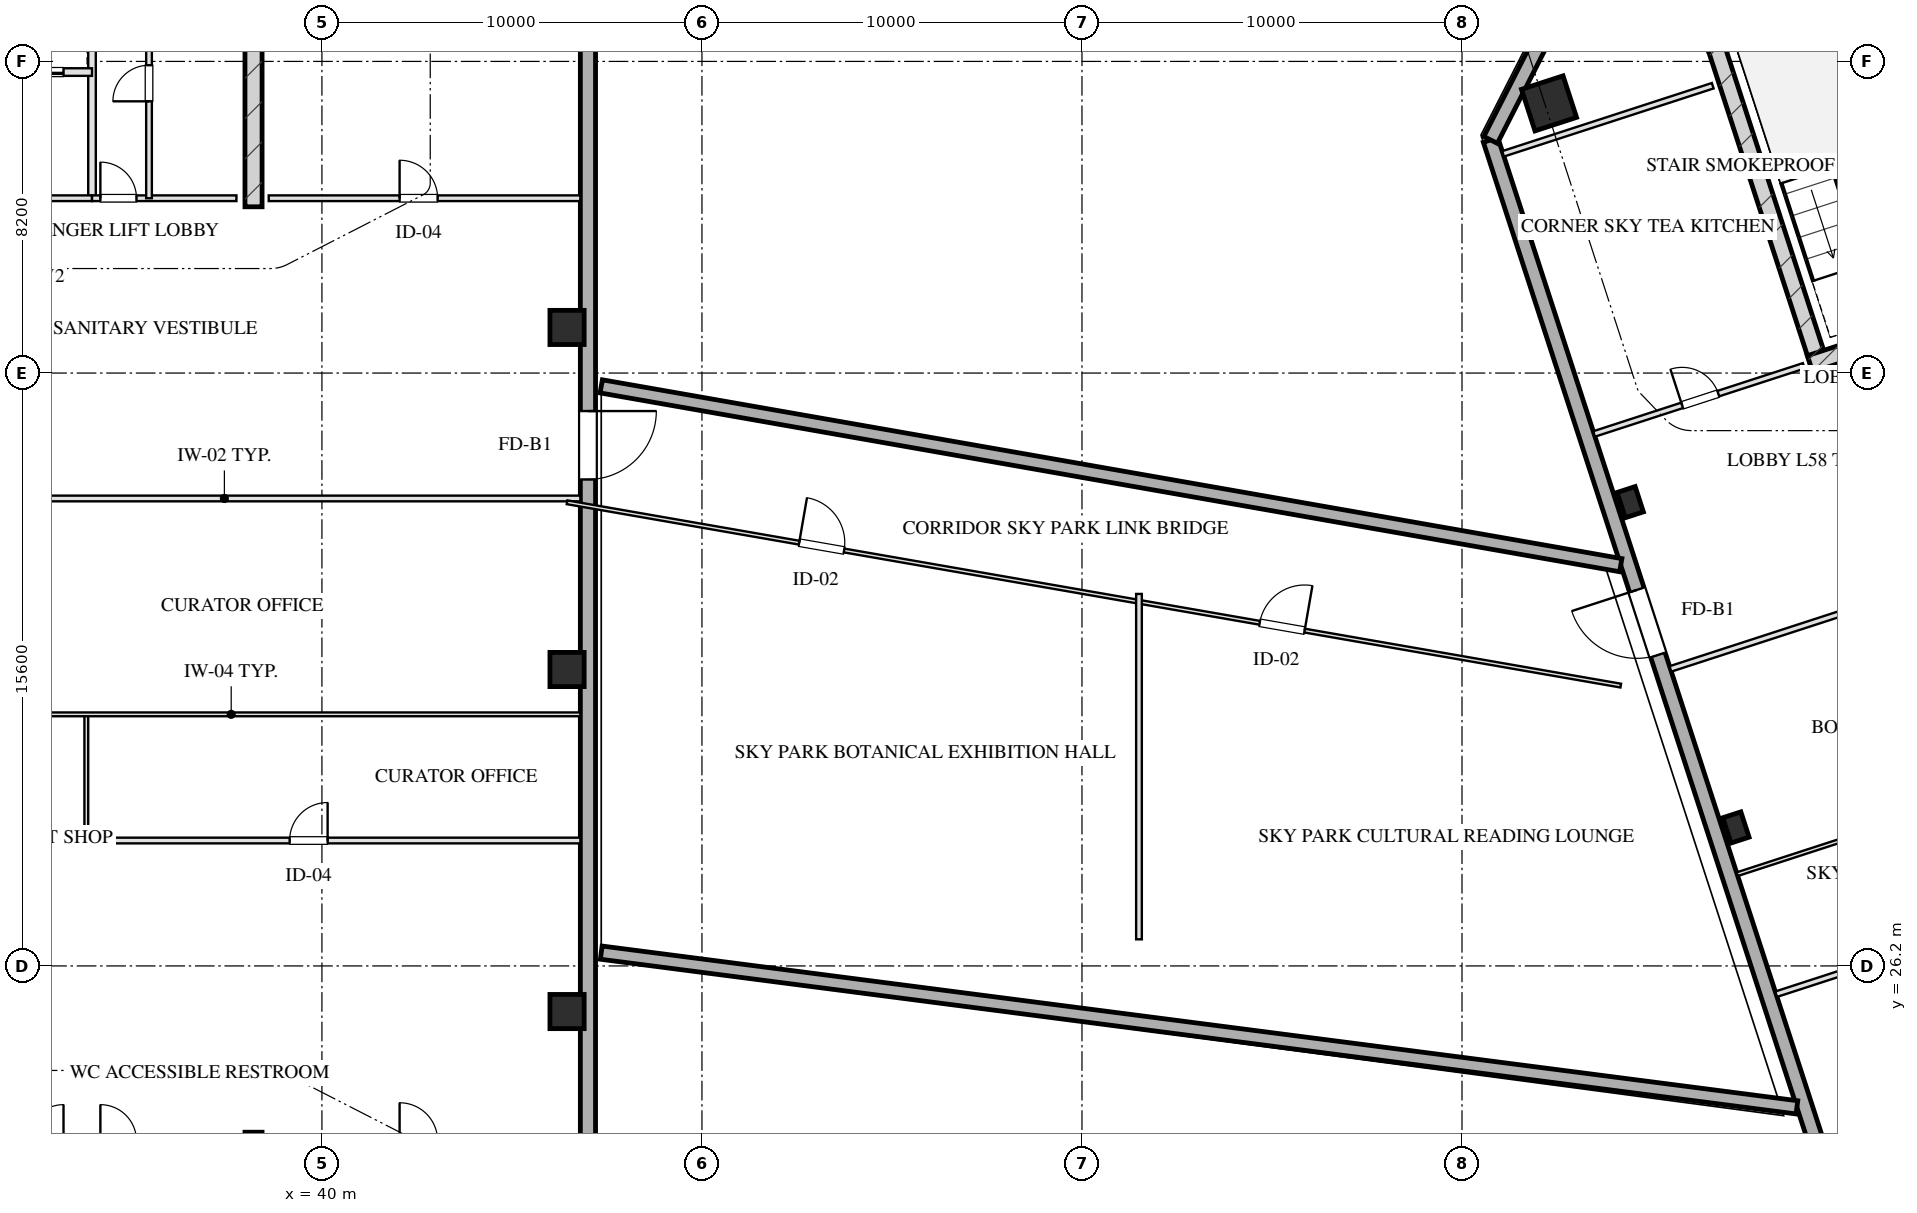
"""IFC4 building model, lengths in metres.
Left out: names, types, materials, properties, quantities, classifications, styles, units other than length and angle.
Written with IfcOpenShell. Run it as: python <this file> out.ifc"""

import sys

from ifc_helpers import new_model, si_unit, direction, frame, frame_2d, origin, origin_2d, place, context, subcontext, project, spatial, rectangle, hollow_rectangle, extrude, element, fill, save


model = new_model("IFC4")
c1 = context("Model", 3, precision=1e-05, world=origin(), true_north=direction((0.0, 1.0)))
c2 = subcontext(c1, "Body", "Model", "MODEL_VIEW")
j1 = project(units=[si_unit("LENGTHUNIT", "METRE"), si_unit("PLANEANGLEUNIT", "RADIAN")], contexts=[c1])
p1 = place(None, origin())
s1 = spatial("IfcSite", under=j1, at=p1, CompositionType="ELEMENT")
p2 = place(p1, origin())
s2 = spatial("IfcBuilding", under=s1, at=p2, CompositionType="ELEMENT")
p3 = place(p2, frame((0.0, 0.0, 216.2)))
s3 = spatial("IfcBuildingStorey", under=s2, at=p3, CompositionType="ELEMENT", Elevation=216.2)
for number, where, z_axis, x_axis in (
    (1, (38.2, 21.825, 0.0), (0.0, 0.0, 1.0), (0.0, -1.0, 0.0)),
    (2, (38.2, 46.175, 0.0), (0.0, 0.0, 1.0), (0.0, 1.0, 0.0)),
):
    element("IfcWall", number, at=place(p3, frame(where, z_axis=z_axis, x_axis=x_axis)), inside=s3, PredefinedType="SHEAR", context=c2, shape_type="SweptSolid", body=[
        extrude(rectangle(XDim=9.33, YDim=0.45, at=frame_2d((4.665, 0.0))), origin(), (0.0, 0.0, 1.0), 3.45),
    ])
p4 = place(p3, frame((79.442, 41.899, 0.0), z_axis=(0.0, 0.0, 1.0), x_axis=(-0.309035778627, 0.951050412717, 0.0)))
e3 = element("IfcWall", 3, at=p4, inside=s3, PredefinedType="SHEAR", context=c2, shape_type="SweptSolid", body=[
    extrude(rectangle(XDim=9.33, YDim=0.45, at=frame_2d((4.665, 0.0))), origin(), (0.0, 0.0, 1.0), 3.45),
])
p5 = place(p3, frame((79.159, 42.043, 0.0), z_axis=(0.0, 0.0, 1.0), x_axis=(0.951047485828, 0.309044785913, 0.0)))
e4 = element("IfcWall", 4, at=p5, inside=s3, PredefinedType="SHEAR", context=c2, shape_type="SweptSolid", body=[
    extrude(rectangle(XDim=4.145, YDim=0.45, at=frame_2d((2.073, 0.0))), origin(), (0.0, 0.0, 1.0), 3.45),
])
for number, where, z_axis, x_axis in (
    (5, (46.45, 25.0, 0.0), (0.0, 0.0, 1.0), (1.0, 0.0, 0.0)),
    (6, (46.45, 34.0, 0.0), (0.0, 0.0, 1.0), (1.0, 0.0, 0.0)),
    (7, (46.45, 43.0, 0.0), (0.0, 0.0, 1.0), (1.0, 0.0, 0.0)),
):
    element("IfcColumn", number, at=place(p3, frame(where, z_axis=z_axis, x_axis=x_axis)), inside=s3, PredefinedType="COLUMN", context=c2, shape_type="SweptSolid", body=[
        extrude(hollow_rectangle(XDim=0.9, YDim=0.9, WallThickness=0.032, at=origin_2d()), origin(), (0.0, 0.0, 1.0), 3.451),
    ])
p6 = place(p3, frame((72.29, 48.896, 0.0), z_axis=(0.0, 0.0, 1.0), x_axis=(0.951056516295, 0.309016994375, 0.0)))
e8 = element("IfcColumn", 8, at=p6, inside=s3, PredefinedType="COLUMN", context=c2, shape_type="SweptSolid", body=[
    extrude(hollow_rectangle(XDim=1.15, YDim=1.15, WallThickness=0.04, at=origin_2d()), origin(), (0.0, 0.0, 1.0), 3.451),
])
for number, where, z_axis, x_axis in (
    (9, (77.208, 29.844, 0.0), (0.0, 0.0, 1.0), (0.951, 0.309, 0.0)),
    (10, (74.427, 38.403, 0.0), (0.0, 0.0, 1.0), (0.951, 0.309, 0.0)),
):
    element("IfcColumn", number, at=place(p3, frame(where, z_axis=z_axis, x_axis=x_axis)), inside=s3, PredefinedType="COLUMN", context=c2, shape_type="SweptSolid", body=[
        extrude(hollow_rectangle(XDim=0.5, YDim=0.7, WallThickness=0.025, at=origin_2d()), origin(), (0.0, 0.0, 1.0), 3.451),
    ])
p7 = place(p3, frame((47.0, 57.2, 0.0), z_axis=(0.0, 0.0, 1.0), x_axis=(0.0, -1.0, 0.0)))
e11 = element("IfcWall", 11, at=p7, inside=s3, PredefinedType="SOLIDWALL", context=c2, shape_type="SweptSolid", body=[
    extrude(rectangle(XDim=46.4, YDim=0.4, at=frame_2d((23.2, 0.0))), origin(), (0.0, 0.0, 1.0), 2.55),
])
p8 = place(p7, frame((16.4, 0.0, 0.0)))
e12 = element("IfcOpeningElement", 12, at=p8, cuts=e11, PredefinedType="OPENING", context=c2, shape_type="SweptSolid", body=[
    extrude(rectangle(XDim=1.8, YDim=2.2, at=frame_2d((0.9, 1.1))), frame((0.0, 0.21, 0.0), z_axis=(0.0, -1.0, 0.0), x_axis=(1.0, 0.0, 0.0)), (0.0, 0.0, 1.0), 0.42),
])
p9 = place(p3, frame((82.618, 11.414, 0.0), z_axis=(0.0, 0.0, 1.0), x_axis=(-0.309016491071, 0.951056679828, 0.0)))
e13 = element("IfcWall", 13, at=p9, inside=s3, PredefinedType="SOLIDWALL", context=c2, shape_type="SweptSolid", body=[
    extrude(rectangle(XDim=38.4, YDim=0.4, at=frame_2d((19.2, 0.0))), origin(), (0.0, 0.0, 1.0), 2.55),
])
p10 = place(p9, frame((24.15, 0.0, 0.0)))
e14 = element("IfcOpeningElement", 14, at=p10, cuts=e13, PredefinedType="OPENING", context=c2, shape_type="SweptSolid", body=[
    extrude(rectangle(XDim=1.8, YDim=2.2, at=frame_2d((0.9, 1.1))), frame((0.0, 0.21, 0.0), z_axis=(0.0, -1.0, 0.0), x_axis=(1.0, 0.0, 0.0)), (0.0, 0.0, 1.0), 0.42),
])
p11 = place(p3, frame((70.752, 47.934, 0.0), z_axis=(0.0, 0.0, 1.0), x_axis=(0.453949291228, 0.891027519774, 0.0)))
e15 = element("IfcWall", 15, at=p11, inside=s3, PredefinedType="SOLIDWALL", context=c2, shape_type="SweptSolid", body=[
    extrude(rectangle(XDim=3.111, YDim=0.4, at=frame_2d((1.556, 0.0))), origin(), (0.0, 0.0, 1.0), 2.55),
])
p12 = place(p3, frame((47.35, 26.55, 0.0), z_axis=(0.0, 0.0, 1.0), x_axis=(0.991732402874, -0.128323189996, 0.0)))
e16 = element("IfcWall", 16, at=p12, inside=s3, PredefinedType="SOLIDWALL", context=c2, shape_type="SweptSolid", body=[
    extrude(rectangle(XDim=31.725, YDim=0.35, at=frame_2d((15.862, 0.0))), origin(), (0.0, 0.0, 1.0), 3.15),
])
p13 = place(p3, frame((74.177, 36.745, 0.0), z_axis=(0.0, 0.0, 1.0), x_axis=(-0.984966283934, 0.172746691759, 0.0)))
e17 = element("IfcWall", 17, at=p13, inside=s3, PredefinedType="SOLIDWALL", context=c2, shape_type="SweptSolid", body=[
    extrude(rectangle(XDim=27.237, YDim=0.35, at=frame_2d((13.618, 0.0))), origin(), (0.0, 0.0, 1.0), 3.15),
])
p14 = place(p3, frame((33.95, 46.4, 0.0), z_axis=(0.0, 0.0, 1.0), x_axis=(0.0, 1.0, 0.0)))
e18 = element("IfcWall", 18, at=p14, inside=s3, PredefinedType="PARTITIONING", context=c2, shape_type="SweptSolid", body=[
    extrude(rectangle(XDim=8.43, YDim=0.2, at=frame_2d((4.215, 0.0))), origin(), (0.0, 0.0, 1.0), 3.155),
])
p15 = place(p3, frame((29.55, 46.4, 0.0), z_axis=(0.0, 0.0, 1.0), x_axis=(1.0, 0.0, 0.0)))
e19 = element("IfcWall", 19, at=p15, inside=s3, PredefinedType="PARTITIONING", context=c2, shape_type="SweptSolid", body=[
    extrude(rectangle(XDim=4.4, YDim=0.15, at=frame_2d((2.2, 0.0))), origin(), (0.0, 0.0, 1.0), 3.155),
])
p16 = place(p15, frame((1.45, 0.0, 0.0)))
e20 = element("IfcOpeningElement", 20, at=p16, cuts=e19, PredefinedType="OPENING", context=c2, shape_type="SweptSolid", body=[
    extrude(rectangle(XDim=1.5, YDim=2.05, at=frame_2d((0.75, 1.025))), frame((0.0, 0.085, 0.0), z_axis=(0.0, -1.0, 0.0), x_axis=(1.0, 0.0, 0.0)), (0.0, 0.0, 1.0), 0.17),
])
p17 = place(p3, frame((29.55, 49.72, 0.0), z_axis=(0.0, 0.0, 1.0), x_axis=(1.0, 0.0, 0.0)))
e21 = element("IfcWall", 21, at=p17, inside=s3, PredefinedType="PARTITIONING", context=c2, shape_type="SweptSolid", body=[
    extrude(rectangle(XDim=4.4, YDim=0.2, at=frame_2d((2.2, 0.0))), origin(), (0.0, 0.0, 1.0), 3.155),
])
p18 = place(p17, frame((0.45, 0.0, 0.0)))
e22 = element("IfcOpeningElement", 22, at=p18, cuts=e21, PredefinedType="OPENING", context=c2, shape_type="SweptSolid", body=[
    extrude(rectangle(XDim=1.1, YDim=2.05, at=frame_2d((0.55, 1.025))), frame((0.0, 0.11, 0.0), z_axis=(0.0, -1.0, 0.0), x_axis=(1.0, 0.0, 0.0)), (0.0, 0.0, 1.0), 0.22),
])
p19 = place(p17, frame((2.55, 0.0, 0.0)))
e23 = element("IfcOpeningElement", 23, at=p19, cuts=e21, PredefinedType="OPENING", context=c2, shape_type="SweptSolid", body=[
    extrude(rectangle(XDim=1.1, YDim=2.05, at=frame_2d((0.55, 1.025))), frame((0.0, 0.11, 0.0), z_axis=(0.0, -1.0, 0.0), x_axis=(1.0, 0.0, 0.0)), (0.0, 0.0, 1.0), 0.22),
])
p20 = place(p3, frame((33.95, 46.4, 0.0), z_axis=(0.0, 0.0, 1.0), x_axis=(1.0, 0.0, 0.0)))
e24 = element("IfcWall", 24, at=p20, inside=s3, PredefinedType="PARTITIONING", context=c2, shape_type="SweptSolid", body=[
    extrude(rectangle(XDim=3.8, YDim=0.15, at=frame_2d((1.9, 0.0))), origin(), (0.0, 0.0, 1.0), 3.155),
])
p21 = place(p20, frame((0.22, 0.0, 0.0)))
e25 = element("IfcOpeningElement", 25, at=p21, cuts=e24, PredefinedType="OPENING", context=c2, shape_type="SweptSolid", body=[
    extrude(rectangle(XDim=0.95, YDim=2.05, at=frame_2d((0.475, 1.025))), frame((0.0, 0.085, 0.0), z_axis=(0.0, -1.0, 0.0), x_axis=(1.0, 0.0, 0.0)), (0.0, 0.0, 1.0), 0.17),
])
p22 = place(p3, frame((35.45, 46.4, 0.0), z_axis=(0.0, 0.0, 1.0), x_axis=(0.0, 1.0, 0.0)))
e26 = element("IfcWall", 26, at=p22, inside=s3, PredefinedType="PARTITIONING", context=c2, shape_type="SweptSolid", body=[
    extrude(rectangle(XDim=8.43, YDim=0.15, at=frame_2d((4.215, 0.0))), origin(), (0.0, 0.0, 1.0), 2.745),
])
p23 = place(p22, frame((2.55, 0.0, 0.0)))
e27 = element("IfcOpeningElement", 27, at=p23, cuts=e26, PredefinedType="OPENING", context=c2, shape_type="SweptSolid", body=[
    extrude(rectangle(XDim=0.95, YDim=2.05, at=frame_2d((0.475, 1.025))), frame((0.0, 0.085, 0.0), z_axis=(0.0, -1.0, 0.0), x_axis=(1.0, 0.0, 0.0)), (0.0, 0.0, 1.0), 0.17),
])
p24 = place(p22, frame((4.7, 0.0, 0.0)))
e28 = element("IfcOpeningElement", 28, at=p24, cuts=e26, PredefinedType="OPENING", context=c2, shape_type="SweptSolid", body=[
    extrude(rectangle(XDim=0.9, YDim=2.05, at=frame_2d((0.45, 1.025))), frame((0.0, 0.085, 0.0), z_axis=(0.0, -1.0, 0.0), x_axis=(1.0, 0.0, 0.0)), (0.0, 0.0, 1.0), 0.17),
])
p25 = place(p22, frame((6.8, 0.0, 0.0)))
e29 = element("IfcOpeningElement", 29, at=p25, cuts=e26, PredefinedType="OPENING", context=c2, shape_type="SweptSolid", body=[
    extrude(rectangle(XDim=0.9, YDim=2.05, at=frame_2d((0.45, 1.025))), frame((0.0, 0.085, 0.0), z_axis=(0.0, -1.0, 0.0), x_axis=(1.0, 0.0, 0.0)), (0.0, 0.0, 1.0), 0.17),
])
p26 = place(p3, frame((38.6, 46.4, 0.0), z_axis=(0.0, 0.0, 1.0), x_axis=(1.0, 0.0, 0.0)))
e30 = element("IfcWall", 30, at=p26, inside=s3, PredefinedType="PARTITIONING", context=c2, shape_type="SweptSolid", body=[
    extrude(rectangle(XDim=8.2, YDim=0.15, at=frame_2d((4.1, 0.0))), origin(), (0.0, 0.0, 1.0), 3.155),
])
p27 = place(p26, frame((3.444, 0.0, 0.0)))
e31 = element("IfcOpeningElement", 31, at=p27, cuts=e30, PredefinedType="OPENING", context=c2, shape_type="SweptSolid", body=[
    extrude(rectangle(XDim=1.0, YDim=2.05, at=frame_2d((0.5, 1.025))), frame((0.0, 0.085, 0.0), z_axis=(0.0, -1.0, 0.0), x_axis=(1.0, 0.0, 0.0)), (0.0, 0.0, 1.0), 0.17),
])
p28 = place(p3, frame((28.425, 29.5, 0.0), z_axis=(0.0, 0.0, 1.0), x_axis=(1.0, 0.0, 0.0)))
e32 = element("IfcWall", 32, at=p28, inside=s3, PredefinedType="PARTITIONING", context=c2, shape_type="SweptSolid", body=[
    extrude(rectangle(XDim=18.375, YDim=0.15, at=frame_2d((9.188, 0.0))), origin(), (0.0, 0.0, 1.0), 3.155),
])
p29 = place(p28, frame((10.725, 0.0, 0.0)))
e33 = element("IfcOpeningElement", 33, at=p29, cuts=e32, PredefinedType="OPENING", context=c2, shape_type="SweptSolid", body=[
    extrude(rectangle(XDim=1.0, YDim=2.05, at=frame_2d((0.5, 1.025))), frame((0.0, 0.085, 0.0), z_axis=(0.0, -1.0, 0.0), x_axis=(1.0, 0.0, 0.0)), (0.0, 0.0, 1.0), 0.17),
])
p30 = place(p3, frame((28.425, 38.5, 0.0), z_axis=(0.0, 0.0, 1.0), x_axis=(1.0, 0.0, 0.0)))
e34 = element("IfcWall", 34, at=p30, inside=s3, PredefinedType="PARTITIONING", context=c2, shape_type="SweptSolid", body=[
    extrude(rectangle(XDim=18.375, YDim=0.15, at=frame_2d((9.188, 0.0))), origin(), (0.0, 0.0, 1.0), 3.155),
])
p31 = place(p3, frame((33.8, 29.5, 0.0), z_axis=(0.0, 0.0, 1.0), x_axis=(0.0, 1.0, 0.0)))
e35 = element("IfcWall", 35, at=p31, inside=s3, PredefinedType="MOVABLE", context=c2, shape_type="SweptSolid", body=[
    extrude(rectangle(XDim=3.32, YDim=0.1, at=frame_2d((1.66, 0.0))), origin(), (0.0, 0.0, 1.0), 3.155),
])
p32 = place(p3, frame((28.425, 32.82, 0.0), z_axis=(0.0, 0.0, 1.0), x_axis=(1.0, 0.0, 0.0)))
e36 = element("IfcWall", 36, at=p32, inside=s3, PredefinedType="MOVABLE", context=c2, shape_type="SweptSolid", body=[
    extrude(rectangle(XDim=18.375, YDim=0.1, at=frame_2d((9.188, 0.0))), origin(), (0.0, 0.0, 1.0), 3.155),
])
p33 = place(p3, frame((71.081, 47.568, 0.0), z_axis=(0.0, 0.0, 1.0), x_axis=(0.951059431056, 0.309008023519, 0.0)))
e37 = element("IfcWall", 37, at=p33, inside=s3, PredefinedType="PARTITIONING", context=c2, shape_type="SweptSolid", body=[
    extrude(rectangle(XDim=5.8, YDim=0.15, at=frame_2d((2.9, 0.0))), origin(), (0.0, 0.0, 1.0), 3.155),
])
p34 = place(p3, frame((73.476, 40.197, 0.0), z_axis=(0.0, 0.0, 1.0), x_axis=(0.951059431056, 0.309008023519, 0.0)))
e38 = element("IfcWall", 38, at=p34, inside=s3, PredefinedType="PARTITIONING", context=c2, shape_type="SweptSolid", body=[
    extrude(rectangle(XDim=5.8, YDim=0.15, at=frame_2d((2.9, 0.0))), origin(), (0.0, 0.0, 1.0), 3.155),
])
p35 = place(p34, frame((2.436, 0.0, 0.0)))
e39 = element("IfcOpeningElement", 39, at=p35, cuts=e38, PredefinedType="OPENING", context=c2, shape_type="SweptSolid", body=[
    extrude(rectangle(XDim=1.0, YDim=2.05, at=frame_2d((0.5, 1.025))), frame((0.0, 0.085, 0.0), z_axis=(0.0, -1.0, 0.0), x_axis=(1.0, 0.0, 0.0)), (0.0, 0.0, 1.0), 0.17),
])
for number, where, z_axis, x_axis in (
    (40, (78.266, 25.456, 0.0), (0.0, 0.0, 1.0), (0.951, 0.309, 0.0)),
    (41, (75.485, 34.015, 0.0), (0.0, 0.0, 1.0), (0.951, 0.309, 0.0)),
):
    element("IfcWall", number, at=place(p3, frame(where, z_axis=z_axis, x_axis=x_axis)), inside=s3, PredefinedType="PARTITIONING", context=c2, shape_type="SweptSolid", body=[
        extrude(rectangle(XDim=10.175, YDim=0.15, at=frame_2d((5.087, 0.0))), origin(), (0.0, 0.0, 1.0), 3.155),
    ])
p36 = place(p3, frame((77.24, 28.613, 0.0), z_axis=(0.0, 0.0, 1.0), x_axis=(0.951055402118, 0.30902042344, 0.0)))
e42 = element("IfcWall", 42, at=p36, inside=s3, PredefinedType="MOVABLE", context=c2, shape_type="SweptSolid", body=[
    extrude(rectangle(XDim=10.175, YDim=0.1, at=frame_2d((5.087, 0.0))), origin(), (0.0, 0.0, 1.0), 3.155),
])
p37 = place(p3, frame((46.45, 38.4, 0.0), z_axis=(0.0, 0.0, 1.0), x_axis=(0.985202712742, -0.171393158571, 0.0)))
e43 = element("IfcWall", 43, at=p37, inside=s3, PredefinedType="MOVABLE", context=c2, shape_type="SweptSolid", body=[
    extrude(rectangle(XDim=28.144, YDim=0.1, at=frame_2d((14.072, 0.0))), origin(), (0.0, 0.0, 1.0), 3.155),
])
p38 = place(p37, frame((6.2, 0.0, 0.0)))
e44 = element("IfcOpeningElement", 44, at=p38, cuts=e43, PredefinedType="OPENING", context=c2, shape_type="SweptSolid", body=[
    extrude(rectangle(XDim=1.2, YDim=2.05, at=frame_2d((0.6, 1.025))), frame((0.0, 0.06, 0.0), z_axis=(0.0, -1.0, 0.0), x_axis=(1.0, 0.0, 0.0)), (0.0, 0.0, 1.0), 0.12),
])
p39 = place(p37, frame((18.5, 0.0, 0.0)))
e45 = element("IfcOpeningElement", 45, at=p39, cuts=e43, PredefinedType="OPENING", context=c2, shape_type="SweptSolid", body=[
    extrude(rectangle(XDim=1.2, YDim=2.05, at=frame_2d((0.6, 1.025))), frame((0.0, 0.06, 0.0), z_axis=(0.0, -1.0, 0.0), x_axis=(1.0, 0.0, 0.0)), (0.0, 0.0, 1.0), 0.12),
])
p40 = place(p3, frame((61.5, 26.9, 0.0), z_axis=(0.0, 0.0, 1.0), x_axis=(0.0, 1.0, 0.0)))
e46 = element("IfcWall", 46, at=p40, inside=s3, PredefinedType="PARTITIONING", context=c2, shape_type="SweptSolid", body=[
    extrude(rectangle(XDim=9.088, YDim=0.15, at=frame_2d((4.544, 0.0))), origin(), (0.0, 0.0, 1.0), 3.155),
])
p41 = place(p8, origin())
e47 = element("IfcDoor", 47, at=p41, inside=s3, OperationType="SINGLE_SWING_LEFT", PredefinedType="DOOR", context=c2, shape_type="SweptSolid", body=[
    extrude(rectangle(XDim=1.8, YDim=2.2, at=frame_2d((0.9, 1.1))), frame((0.0, 0.025, 0.0), z_axis=(0.0, -1.0, 0.0), x_axis=(1.0, 0.0, 0.0)), (0.0, 0.0, 1.0), 0.05),
])
fill(e12, e47)
p42 = place(p10, origin())
e48 = element("IfcDoor", 48, at=p42, inside=s3, OperationType="SINGLE_SWING_RIGHT", PredefinedType="DOOR", context=c2, shape_type="SweptSolid", body=[
    extrude(rectangle(XDim=1.8, YDim=2.2, at=frame_2d((0.9, 1.1))), frame((0.0, 0.025, 0.0), z_axis=(0.0, -1.0, 0.0), x_axis=(1.0, 0.0, 0.0)), (0.0, 0.0, 1.0), 0.05),
])
fill(e14, e48)
p43 = place(p19, origin())
e49 = element("IfcDoor", 49, at=p43, inside=s3, OperationType="DOUBLE_DOOR_SLIDING", PredefinedType="DOOR", context=c2, shape_type="SweptSolid", body=[
    extrude(rectangle(XDim=1.1, YDim=2.05, at=frame_2d((0.55, 1.025))), frame((0.0, 0.025, 0.0), z_axis=(0.0, -1.0, 0.0), x_axis=(1.0, 0.0, 0.0)), (0.0, 0.0, 1.0), 0.05),
])
fill(e23, e49)
p44 = place(p21, origin())
e50 = element("IfcDoor", 50, at=p44, inside=s3, OperationType="SINGLE_SWING_LEFT", PredefinedType="DOOR", context=c2, shape_type="SweptSolid", body=[
    extrude(rectangle(XDim=0.95, YDim=2.05, at=frame_2d((0.475, 1.025))), frame((0.0, 0.025, 0.0), z_axis=(0.0, -1.0, 0.0), x_axis=(1.0, 0.0, 0.0)), (0.0, 0.0, 1.0), 0.05),
])
fill(e25, e50)
p45 = place(p23, origin())
e51 = element("IfcDoor", 51, at=p45, inside=s3, OperationType="SINGLE_SWING_LEFT", PredefinedType="DOOR", context=c2, shape_type="SweptSolid", body=[
    extrude(rectangle(XDim=0.95, YDim=2.05, at=frame_2d((0.475, 1.025))), frame((0.0, 0.025, 0.0), z_axis=(0.0, -1.0, 0.0), x_axis=(1.0, 0.0, 0.0)), (0.0, 0.0, 1.0), 0.05),
])
fill(e27, e51)
p46 = place(p27, origin())
e52 = element("IfcDoor", 52, at=p46, inside=s3, OperationType="SINGLE_SWING_LEFT", PredefinedType="DOOR", context=c2, shape_type="SweptSolid", body=[
    extrude(rectangle(XDim=1.0, YDim=2.05, at=frame_2d((0.5, 1.025))), frame((0.0, 0.025, 0.0), z_axis=(0.0, -1.0, 0.0), x_axis=(1.0, 0.0, 0.0)), (0.0, 0.0, 1.0), 0.05),
])
fill(e31, e52)
p47 = place(p29, origin())
e53 = element("IfcDoor", 53, at=p47, inside=s3, OperationType="SINGLE_SWING_RIGHT", PredefinedType="DOOR", context=c2, shape_type="SweptSolid", body=[
    extrude(rectangle(XDim=1.0, YDim=2.05, at=frame_2d((0.5, 1.025))), frame((0.0, 0.025, 0.0), z_axis=(0.0, -1.0, 0.0), x_axis=(1.0, 0.0, 0.0)), (0.0, 0.0, 1.0), 0.05),
])
fill(e33, e53)
p48 = place(p35, origin())
e54 = element("IfcDoor", 54, at=p48, inside=s3, OperationType="SINGLE_SWING_LEFT", PredefinedType="DOOR", context=c2, shape_type="SweptSolid", body=[
    extrude(rectangle(XDim=1.0, YDim=2.05, at=frame_2d((0.5, 1.025))), frame((0.0, 0.025, 0.0), z_axis=(0.0, -1.0, 0.0), x_axis=(1.0, 0.0, 0.0)), (0.0, 0.0, 1.0), 0.05),
])
fill(e39, e54)
p49 = place(p38, origin())
e55 = element("IfcDoor", 55, at=p49, inside=s3, OperationType="SINGLE_SWING_LEFT", PredefinedType="DOOR", context=c2, shape_type="SweptSolid", body=[
    extrude(rectangle(XDim=1.2, YDim=2.05, at=frame_2d((0.6, 1.025))), frame((0.0, 0.025, 0.0), z_axis=(0.0, -1.0, 0.0), x_axis=(1.0, 0.0, 0.0)), (0.0, 0.0, 1.0), 0.05),
])
fill(e44, e55)
p50 = place(p39, origin())
e56 = element("IfcDoor", 56, at=p50, inside=s3, OperationType="SINGLE_SWING_RIGHT", PredefinedType="DOOR", context=c2, shape_type="SweptSolid", body=[
    extrude(rectangle(XDim=1.2, YDim=2.05, at=frame_2d((0.6, 1.025))), frame((0.0, 0.025, 0.0), z_axis=(0.0, -1.0, 0.0), x_axis=(1.0, 0.0, 0.0)), (0.0, 0.0, 1.0), 0.05),
])
fill(e45, e56)
save(model, sys.argv[1])
